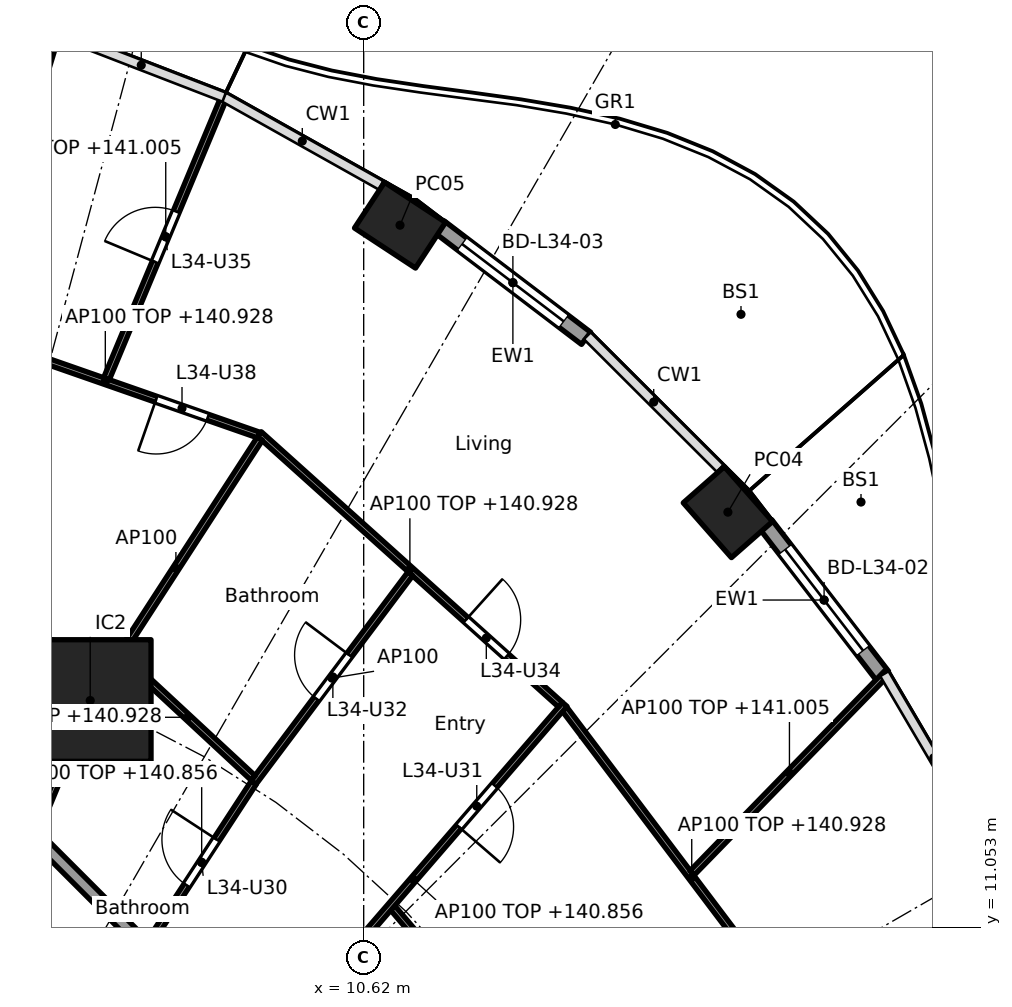
"""IFC4 building model, lengths in metres.
Left out: names, types, materials, properties, quantities, classifications, styles, units other than length and angle.
Written with IfcOpenShell. Run it as: python <this file> out.ifc"""

import sys

from ifc_helpers import new_model, si_unit, direction, frame, frame_2d, origin, origin_2d, place, context, subcontext, project, spatial, rectangle, hollow_rectangle, extrude, element, fill, save


model = new_model("IFC4")
c1 = context("Model", 3, precision=1e-05, world=origin(), true_north=direction((0.0, 1.0)))
c2 = subcontext(c1, "Body", "Model", "MODEL_VIEW")
j1 = project(units=[si_unit("LENGTHUNIT", "METRE"), si_unit("PLANEANGLEUNIT", "RADIAN")], contexts=[c1])
p1 = place(None, origin())
s1 = spatial("IfcSite", under=j1, at=p1, CompositionType="ELEMENT")
p2 = place(p1, origin())
s2 = spatial("IfcBuilding", under=s1, at=p2, CompositionType="ELEMENT")
p3 = place(p2, frame((0.0, 0.0, 138.1)))
s3 = spatial("IfcBuildingStorey", under=s2, at=p3, CompositionType="ELEMENT", Elevation=138.1)
for number, where, z_axis, x_axis in (
    (1, (16.61, 17.88, 0.0), (0.0, 0.0, 1.0), (-0.66, 0.751, 0.0)),
    (2, (11.218, 22.599, 0.0), (0.0, 0.0, 1.0), (-0.836, 0.549, 0.0)),
    (3, (4.938, 25.565, 0.0), (0.0, 0.0, 1.0), (-0.957, 0.292, 0.0)),
):
    element("IfcColumn", number, at=place(p3, frame(where, z_axis=z_axis, x_axis=x_axis)), inside=s3, PredefinedType="COLUMN", context=c2, shape_type="SweptSolid", body=[
        extrude(hollow_rectangle(XDim=1.2, YDim=0.9, WallThickness=0.04, at=origin_2d()), origin(), (0.0, 0.0, 1.0), 3.7),
    ])
p4 = place(p3, frame((6.123, 14.782, 0.0), z_axis=(0.0, 0.0, 1.0), x_axis=(1.0, 0.0, 0.0)))
e4 = element("IfcColumn", 4, at=p4, inside=s3, PredefinedType="COLUMN", context=c2, shape_type="SweptSolid", body=[
    extrude(rectangle(XDim=2.0, YDim=2.0, at=origin_2d()), origin(), (0.0, 0.0, 1.0), 3.7),
])
p5 = place(p3, frame((17.23, 17.682, 0.0), z_axis=(0.0, 0.0, 1.0), x_axis=(0.610429847179, -0.792070326217, 0.0)))
e5 = element("IfcWall", 5, at=p5, inside=s3, PredefinedType="SOLIDWALL", context=c2, shape_type="SweptSolid", body=[
    extrude(rectangle(XDim=3.149, YDim=0.25, at=frame_2d((1.575, 0.0))), origin(), (0.0, 0.0, 1.0), 3.44),
])
p6 = place(p5, frame((0.525, 0.0, 0.0)))
e6 = element("IfcOpeningElement", 6, at=p6, cuts=e5, PredefinedType="OPENING", context=c2, shape_type="SweptSolid", body=[
    extrude(rectangle(XDim=2.1, YDim=2.4, at=frame_2d((1.05, 1.2))), frame((0.0, 0.135, 0.0), z_axis=(0.0, -1.0, 0.0), x_axis=(1.0, 0.0, 0.0)), (0.0, 0.0, 1.0), 0.27),
])
p7 = place(p3, frame((11.869, 22.569, 0.0), z_axis=(0.0, 0.0, 1.0), x_axis=(0.796022231079, -0.605267385233, 0.0)))
e7 = element("IfcWall", 7, at=p7, inside=s3, PredefinedType="SOLIDWALL", context=c2, shape_type="SweptSolid", body=[
    extrude(rectangle(XDim=3.026, YDim=0.25, at=frame_2d((1.513, 0.0))), origin(), (0.0, 0.0, 1.0), 3.44),
])
p8 = place(p7, frame((0.463, 0.0, 0.0)))
e8 = element("IfcOpeningElement", 8, at=p8, cuts=e7, PredefinedType="OPENING", context=c2, shape_type="SweptSolid", body=[
    extrude(rectangle(XDim=2.1, YDim=2.4, at=frame_2d((1.05, 1.2))), frame((0.0, 0.135, 0.0), z_axis=(0.0, -1.0, 0.0), x_axis=(1.0, 0.0, 0.0)), (0.0, 0.0, 1.0), 0.27),
])
p9 = place(p3, frame((12.635, 5.134, 0.0), z_axis=(0.0, 0.0, 1.0), x_axis=(-0.707106781187, 0.707106781187, 0.0)))
e9 = element("IfcWall", 9, at=p9, inside=s3, PredefinedType="PARTITIONING", context=c2, shape_type="SweptSolid", body=[
    extrude(rectangle(XDim=10.609, YDim=0.2, at=frame_2d((5.305, 0.0))), origin(), (0.0, 0.0, 1.0), 3.44),
])
p10 = place(p9, frame((6.106, 0.0, 0.0)))
e10 = element("IfcOpeningElement", 10, at=p10, cuts=e9, PredefinedType="OPENING", context=c2, shape_type="SweptSolid", body=[
    extrude(rectangle(XDim=1.0, YDim=2.1, at=frame_2d((0.5, 1.05))), frame((0.0, 0.11, 0.0), z_axis=(0.0, -1.0, 0.0), x_axis=(1.0, 0.0, 0.0)), (0.0, 0.0, 1.0), 0.22),
])
p11 = place(p3, frame((15.25, 6.483, 0.0), z_axis=(0.0, 0.0, 1.0), x_axis=(-0.647379829894, 0.762167537912, 0.0)))
e11 = element("IfcWall", 11, at=p11, inside=s3, PredefinedType="PARTITIONING", context=c2, shape_type="SweptSolid", body=[
    extrude(rectangle(XDim=6.413, YDim=0.1, at=frame_2d((3.206, 0.0))), origin(), (0.0, 0.0, 1.0), 2.828),
])
p12 = place(p3, frame((18.106, 9.098, 0.0), z_axis=(0.0, 0.0, 1.0), x_axis=(-0.602393803621, 0.798199038686, 0.0)))
e12 = element("IfcWall", 12, at=p12, inside=s3, PredefinedType="PARTITIONING", context=c2, shape_type="SweptSolid", body=[
    extrude(rectangle(XDim=6.944, YDim=0.1, at=frame_2d((3.472, 0.0))), origin(), (0.0, 0.0, 1.0), 2.828),
])
p13 = place(p3, frame((16.02, 11.946, 0.0), z_axis=(0.0, 0.0, 1.0), x_axis=(0.697741638446, 0.71634949988, 0.0)))
e13 = element("IfcWall", 13, at=p13, inside=s3, PredefinedType="PARTITIONING", context=c2, shape_type="SweptSolid", body=[
    extrude(rectangle(XDim=4.592, YDim=0.1, at=frame_2d((2.296, 0.0))), origin(), (0.0, 0.0, 1.0), 2.905),
])
p14 = place(p3, frame((8.95, 8.96, 0.0), z_axis=(0.0, 0.0, 1.0), x_axis=(0.653829477183, 0.756641932995, 0.0)))
e14 = element("IfcWall", 14, at=p14, inside=s3, PredefinedType="PARTITIONING", context=c2, shape_type="SweptSolid", body=[
    extrude(rectangle(XDim=7.611, YDim=0.1, at=frame_2d((3.805, 0.0))), origin(), (0.0, 0.0, 1.0), 2.756),
])
p15 = place(p14, frame((1.168, 0.0, 0.0)))
e15 = element("IfcOpeningElement", 15, at=p15, cuts=e14, PredefinedType="OPENING", context=c2, shape_type="SweptSolid", body=[
    extrude(rectangle(XDim=0.9, YDim=2.1, at=frame_2d((0.45, 1.05))), frame((0.0, 0.06, 0.0), z_axis=(0.0, -1.0, 0.0), x_axis=(1.0, 0.0, 0.0)), (0.0, 0.0, 1.0), 0.12),
])
p16 = place(p14, frame((4.948, 0.0, 0.0)))
e16 = element("IfcOpeningElement", 16, at=p16, cuts=e14, PredefinedType="OPENING", context=c2, shape_type="SweptSolid", body=[
    extrude(rectangle(XDim=0.9, YDim=2.1, at=frame_2d((0.45, 1.05))), frame((0.0, 0.06, 0.0), z_axis=(0.0, -1.0, 0.0), x_axis=(1.0, 0.0, 0.0)), (0.0, 0.0, 1.0), 0.12),
])
p17 = place(p3, frame((13.856, 14.714, 0.0), z_axis=(0.0, 0.0, 1.0), x_axis=(-0.743793479211, 0.668409500444, 0.0)))
e17 = element("IfcWall", 17, at=p17, inside=s3, PredefinedType="PARTITIONING", context=c2, shape_type="SweptSolid", body=[
    extrude(rectangle(XDim=6.659, YDim=0.1, at=frame_2d((3.329, 0.0))), origin(), (0.0, 0.0, 1.0), 2.828),
])
p18 = place(p17, frame((1.19, 0.0, 0.0)))
e18 = element("IfcOpeningElement", 18, at=p18, cuts=e17, PredefinedType="OPENING", context=c2, shape_type="SweptSolid", body=[
    extrude(rectangle(XDim=0.9, YDim=2.1, at=frame_2d((0.45, 1.05))), frame((0.0, 0.06, 0.0), z_axis=(0.0, -1.0, 0.0), x_axis=(1.0, 0.0, 0.0)), (0.0, 0.0, 1.0), 0.12),
])
p19 = place(p3, frame((7.099, 10.808, 0.0), z_axis=(0.0, 0.0, 1.0), x_axis=(0.546709757921, 0.837322184463, 0.0)))
e19 = element("IfcWall", 19, at=p19, inside=s3, PredefinedType="PARTITIONING", context=c2, shape_type="SweptSolid", body=[
    extrude(rectangle(XDim=3.134, YDim=0.1, at=frame_2d((1.567, 0.0))), origin(), (0.0, 0.0, 1.0), 2.756),
])
p20 = place(p19, frame((1.117, 0.0, 0.0)))
e20 = element("IfcOpeningElement", 20, at=p20, cuts=e19, PredefinedType="OPENING", context=c2, shape_type="SweptSolid", body=[
    extrude(rectangle(XDim=0.9, YDim=2.1, at=frame_2d((0.45, 1.05))), frame((0.0, 0.06, 0.0), z_axis=(0.0, -1.0, 0.0), x_axis=(1.0, 0.0, 0.0)), (0.0, 0.0, 1.0), 0.12),
])
p21 = place(p3, frame((8.81, 13.434, 0.0), z_axis=(0.0, 0.0, 1.0), x_axis=(0.600491337497, 0.799631261014, 0.0)))
e21 = element("IfcWall", 21, at=p21, inside=s3, PredefinedType="PARTITIONING", context=c2, shape_type="SweptSolid", body=[
    extrude(rectangle(XDim=4.292, YDim=0.1, at=frame_2d((2.146, 0.0))), origin(), (0.0, 0.0, 1.0), 3.44),
])
p22 = place(p21, frame((1.721, 0.0, 0.0)))
e22 = element("IfcOpeningElement", 22, at=p22, cuts=e21, PredefinedType="OPENING", context=c2, shape_type="SweptSolid", body=[
    extrude(rectangle(XDim=0.9, YDim=2.1, at=frame_2d((0.45, 1.05))), frame((0.0, 0.06, 0.0), z_axis=(0.0, -1.0, 0.0), x_axis=(1.0, 0.0, 0.0)), (0.0, 0.0, 1.0), 0.12),
])
p23 = place(p3, frame((8.803, 13.508, 0.0), z_axis=(0.0, 0.0, 1.0), x_axis=(-0.733130973758, 0.680087476224, 0.0)))
e23 = element("IfcWall", 23, at=p23, inside=s3, PredefinedType="PARTITIONING", context=c2, shape_type="SweptSolid", body=[
    extrude(rectangle(XDim=2.937, YDim=0.1, at=frame_2d((1.468, 0.0))), origin(), (0.0, 0.0, 1.0), 2.828),
])
p24 = place(p3, frame((5.243, 12.657, 0.0), z_axis=(0.0, 0.0, 1.0), x_axis=(0.382703272338, 0.923871314276, 0.0)))
e24 = element("IfcWall", 24, at=p24, inside=s3, PredefinedType="PARTITIONING", context=c2, shape_type="SweptSolid", body=[
    extrude(rectangle(XDim=2.249, YDim=0.1, at=frame_2d((1.125, 0.0))), origin(), (0.0, 0.0, 1.0), 3.44),
])
p25 = place(p3, frame((6.15, 14.824, 0.0), z_axis=(0.0, 0.0, 1.0), x_axis=(0.543711280797, 0.839272329542, 0.0)))
e25 = element("IfcWall", 25, at=p25, inside=s3, PredefinedType="PARTITIONING", context=c2, shape_type="SweptSolid", body=[
    extrude(rectangle(XDim=5.083, YDim=0.1, at=frame_2d((2.541, 0.0))), origin(), (0.0, 0.0, 1.0), 3.44),
])
p26 = place(p3, frame((6.564, 15.547, 0.0), z_axis=(0.0, 0.0, 1.0), x_axis=(-0.986269521186, 0.165143669511, 0.0)))
e26 = element("IfcWall", 26, at=p26, inside=s3, PredefinedType="PARTITIONING", context=c2, shape_type="SweptSolid", body=[
    extrude(rectangle(XDim=3.934, YDim=0.1, at=frame_2d((1.967, 0.0))), origin(), (0.0, 0.0, 1.0), 2.828),
])
p27 = place(p3, frame((8.894, 19.148, 0.0), z_axis=(0.0, 0.0, 1.0), x_axis=(-0.944182005381, 0.329424256414, 0.0)))
e27 = element("IfcWall", 27, at=p27, inside=s3, PredefinedType="PARTITIONING", context=c2, shape_type="SweptSolid", body=[
    extrude(rectangle(XDim=5.344, YDim=0.1, at=frame_2d((2.672, 0.0))), origin(), (0.0, 0.0, 1.0), 2.828),
])
p28 = place(p27, frame((0.886, 0.0, 0.0)))
e28 = element("IfcOpeningElement", 28, at=p28, cuts=e27, PredefinedType="OPENING", context=c2, shape_type="SweptSolid", body=[
    extrude(rectangle(XDim=0.9, YDim=2.1, at=frame_2d((0.45, 1.05))), frame((0.0, 0.06, 0.0), z_axis=(0.0, -1.0, 0.0), x_axis=(1.0, 0.0, 0.0)), (0.0, 0.0, 1.0), 0.12),
])
p29 = place(p3, frame((6.39, 20.074, 0.0), z_axis=(0.0, 0.0, 1.0), x_axis=(0.385304133029, 0.922789642915, 0.0)))
e29 = element("IfcWall", 29, at=p29, inside=s3, PredefinedType="PARTITIONING", context=c2, shape_type="SweptSolid", body=[
    extrude(rectangle(XDim=5.058, YDim=0.1, at=frame_2d((2.529, 0.0))), origin(), (0.0, 0.0, 1.0), 2.905),
])
p30 = place(p29, frame((2.079, 0.0, 0.0)))
e30 = element("IfcOpeningElement", 30, at=p30, cuts=e29, PredefinedType="OPENING", context=c2, shape_type="SweptSolid", body=[
    extrude(rectangle(XDim=0.9, YDim=2.1, at=frame_2d((0.45, 1.05))), frame((0.0, 0.06, 0.0), z_axis=(0.0, -1.0, 0.0), x_axis=(1.0, 0.0, 0.0)), (0.0, 0.0, 1.0), 0.12),
])
p31 = place(p6, origin())
e31 = element("IfcDoor", 31, at=p31, inside=s3, OperationType="SLIDING_TO_LEFT", PredefinedType="DOOR", context=c2, shape_type="SweptSolid", body=[
    extrude(rectangle(XDim=2.1, YDim=2.4, at=frame_2d((1.05, 1.2))), frame((0.0, 0.025, 0.0), z_axis=(0.0, -1.0, 0.0), x_axis=(1.0, 0.0, 0.0)), (0.0, 0.0, 1.0), 0.05),
])
fill(e6, e31)
p32 = place(p8, origin())
e32 = element("IfcDoor", 32, at=p32, inside=s3, OperationType="SLIDING_TO_LEFT", PredefinedType="DOOR", context=c2, shape_type="SweptSolid", body=[
    extrude(rectangle(XDim=2.1, YDim=2.4, at=frame_2d((1.05, 1.2))), frame((0.0, 0.025, 0.0), z_axis=(0.0, -1.0, 0.0), x_axis=(1.0, 0.0, 0.0)), (0.0, 0.0, 1.0), 0.05),
])
fill(e8, e32)
p33 = place(p20, origin())
e33 = element("IfcDoor", 33, at=p33, inside=s3, OperationType="SINGLE_SWING_RIGHT", PredefinedType="DOOR", context=c2, shape_type="SweptSolid", body=[
    extrude(rectangle(XDim=0.9, YDim=2.1, at=frame_2d((0.45, 1.05))), frame((0.0, 0.025, 0.0), z_axis=(0.0, -1.0, 0.0), x_axis=(1.0, 0.0, 0.0)), (0.0, 0.0, 1.0), 0.05),
])
fill(e20, e33)
p34 = place(p16, frame((0.9, 0.0, 0.0), x_axis=(-1.0, 0.0, 0.0)))
e34 = element("IfcDoor", 34, at=p34, inside=s3, OperationType="SINGLE_SWING_RIGHT", PredefinedType="DOOR", context=c2, shape_type="SweptSolid", body=[
    extrude(rectangle(XDim=0.9, YDim=2.1, at=frame_2d((0.45, 1.05))), frame((0.0, 0.025, 0.0), z_axis=(0.0, -1.0, 0.0), x_axis=(1.0, 0.0, 0.0)), (0.0, 0.0, 1.0), 0.05),
])
fill(e16, e34)
p35 = place(p22, origin())
e35 = element("IfcDoor", 35, at=p35, inside=s3, OperationType="SINGLE_SWING_RIGHT", PredefinedType="DOOR", context=c2, shape_type="SweptSolid", body=[
    extrude(rectangle(XDim=0.9, YDim=2.1, at=frame_2d((0.45, 1.05))), frame((0.0, 0.025, 0.0), z_axis=(0.0, -1.0, 0.0), x_axis=(1.0, 0.0, 0.0)), (0.0, 0.0, 1.0), 0.05),
])
fill(e22, e35)
p36 = place(p18, frame((0.9, 0.0, 0.0), x_axis=(-1.0, 0.0, 0.0)))
e36 = element("IfcDoor", 36, at=p36, inside=s3, OperationType="SINGLE_SWING_LEFT", PredefinedType="DOOR", context=c2, shape_type="SweptSolid", body=[
    extrude(rectangle(XDim=0.9, YDim=2.1, at=frame_2d((0.45, 1.05))), frame((0.0, 0.025, 0.0), z_axis=(0.0, -1.0, 0.0), x_axis=(1.0, 0.0, 0.0)), (0.0, 0.0, 1.0), 0.05),
])
fill(e18, e36)
p37 = place(p30, origin())
e37 = element("IfcDoor", 37, at=p37, inside=s3, OperationType="SINGLE_SWING_LEFT", PredefinedType="DOOR", context=c2, shape_type="SweptSolid", body=[
    extrude(rectangle(XDim=0.9, YDim=2.1, at=frame_2d((0.45, 1.05))), frame((0.0, 0.025, 0.0), z_axis=(0.0, -1.0, 0.0), x_axis=(1.0, 0.0, 0.0)), (0.0, 0.0, 1.0), 0.05),
])
fill(e30, e37)
p38 = place(p28, origin())
e38 = element("IfcDoor", 38, at=p38, inside=s3, OperationType="SINGLE_SWING_RIGHT", PredefinedType="DOOR", context=c2, shape_type="SweptSolid", body=[
    extrude(rectangle(XDim=0.9, YDim=2.1, at=frame_2d((0.45, 1.05))), frame((0.0, 0.025, 0.0), z_axis=(0.0, -1.0, 0.0), x_axis=(1.0, 0.0, 0.0)), (0.0, 0.0, 1.0), 0.05),
])
fill(e28, e38)
save(model, sys.argv[1])
